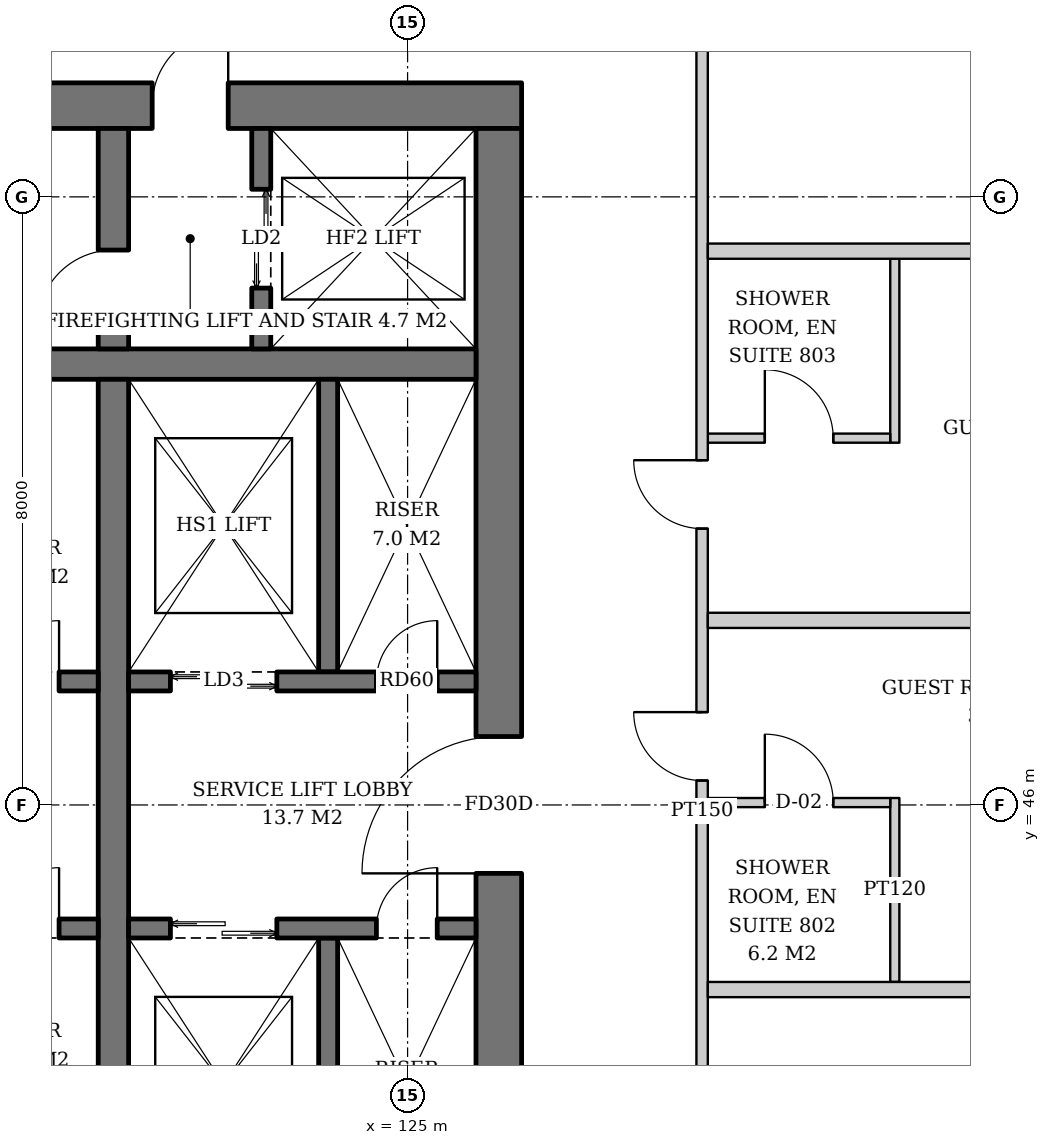
"""IFC4 building model, lengths in metres.
Left out: names, types, materials, properties, quantities, classifications, styles, units other than length and angle.
Written with IfcOpenShell. Run it as: python <this file> out.ifc"""

import sys

from ifc_helpers import new_model, si_unit, direction, frame, frame_2d, origin, place, context, subcontext, project, spatial, rectangle, extrude, element, fill, save


model = new_model("IFC4")
c1 = context("Model", 3, precision=1e-05, world=origin(), true_north=direction((0.0, 1.0)))
c2 = subcontext(c1, "Body", "Model", "MODEL_VIEW")
j1 = project(units=[si_unit("LENGTHUNIT", "METRE"), si_unit("PLANEANGLEUNIT", "RADIAN")], contexts=[c1])
p1 = place(None, origin())
s1 = spatial("IfcSite", under=j1, at=p1, CompositionType="ELEMENT")
p2 = place(p1, origin())
s2 = spatial("IfcBuilding", under=s1, at=p2, CompositionType="ELEMENT")
p3 = place(p2, frame((0.0, 0.0, 36.2)))
s3 = spatial("IfcBuildingStorey", under=s2, at=p3, CompositionType="ELEMENT", Elevation=36.2)
p4 = place(p3, frame((107.5, 55.2, 0.0), z_axis=(0.0, 0.0, 1.0), x_axis=(1.0, 0.0, 0.0)))
e1 = element("IfcWall", 1, at=p4, inside=s3, PredefinedType="SHEAR", context=c2, shape_type="SweptSolid", body=[
    extrude(rectangle(XDim=19.0, YDim=0.6, at=frame_2d((9.5, 0.0))), origin(), (0.0, 0.0, 1.0), 3.8),
])
p5 = place(p4, frame((14.14, 0.0, 0.0)))
e2 = element("IfcOpeningElement", 2, at=p5, cuts=e1, PredefinedType="OPENING", context=c2, shape_type="SweptSolid", body=[
    extrude(rectangle(XDim=1.0, YDim=2.1, at=frame_2d((0.5, 1.05))), frame((0.0, 0.31, 0.0), z_axis=(0.0, -1.0, 0.0), x_axis=(1.0, 0.0, 0.0)), (0.0, 0.0, 1.0), 0.62),
])
p6 = place(p4, frame((2.425, 0.0, 0.0)))
e3 = element("IfcOpeningElement", 3, at=p6, cuts=e1, PredefinedType="OPENING", context=c2, shape_type="SweptSolid", body=[
    extrude(rectangle(XDim=1.0, YDim=2.1, at=frame_2d((0.5, 1.05))), frame((0.0, 0.31, 0.0), z_axis=(0.0, -1.0, 0.0), x_axis=(1.0, 0.0, 0.0)), (0.0, 0.0, 1.0), 0.62),
])
p7 = place(p3, frame((126.2, 37.1, 0.0), z_axis=(0.0, 0.0, 1.0), x_axis=(0.0, 1.0, 0.0)))
e4 = element("IfcWall", 4, at=p7, inside=s3, PredefinedType="SHEAR", context=c2, shape_type="SweptSolid", body=[
    extrude(rectangle(XDim=17.8, YDim=0.6, at=frame_2d((8.9, 0.0))), origin(), (0.0, 0.0, 1.0), 3.8),
])
p8 = place(p7, frame((8.0, 0.0, 0.0)))
e5 = element("IfcOpeningElement", 5, at=p8, cuts=e4, PredefinedType="OPENING", context=c2, shape_type="SweptSolid", body=[
    extrude(rectangle(XDim=1.8, YDim=2.4, at=frame_2d((0.9, 1.2))), frame((0.0, 0.31, 0.0), z_axis=(0.0, -1.0, 0.0), x_axis=(1.0, 0.0, 0.0)), (0.0, 0.0, 1.0), 0.62),
])
p9 = place(p3, frame((108.1, 51.8, 0.0), z_axis=(0.0, 0.0, 1.0), x_axis=(1.0, 0.0, 0.0)))
e6 = element("IfcWall", 6, at=p9, inside=s3, PredefinedType="SHEAR", context=c2, shape_type="SweptSolid", body=[
    extrude(rectangle(XDim=17.8, YDim=0.4, at=frame_2d((8.9, 0.0))), origin(), (0.0, 0.0, 1.0), 3.8),
])
p10 = place(p3, frame((121.13, 40.4, 0.0), z_axis=(0.0, 0.0, 1.0), x_axis=(0.0, 1.0, 0.0)))
e7 = element("IfcWall", 7, at=p10, inside=s3, PredefinedType="SHEAR", context=c2, shape_type="SweptSolid", body=[
    extrude(rectangle(XDim=11.2, YDim=0.4, at=frame_2d((5.6, 0.0))), origin(), (0.0, 0.0, 1.0), 3.8),
])
p11 = place(p3, frame((121.13, 52.0, 0.0), z_axis=(0.0, 0.0, 1.0), x_axis=(0.0, 1.0, 0.0)))
e8 = element("IfcWall", 8, at=p11, inside=s3, PredefinedType="SHEAR", context=c2, shape_type="SweptSolid", body=[
    extrude(rectangle(XDim=2.9, YDim=0.4, at=frame_2d((1.45, 0.0))), origin(), (0.0, 0.0, 1.0), 3.8),
])
p12 = place(p11, frame((0.3, 0.0, 0.0)))
e9 = element("IfcOpeningElement", 9, at=p12, cuts=e8, PredefinedType="OPENING", context=c2, shape_type="SweptSolid", body=[
    extrude(rectangle(XDim=1.0, YDim=2.1, at=frame_2d((0.5, 1.05))), frame((0.0, 0.21, 0.0), z_axis=(0.0, -1.0, 0.0), x_axis=(1.0, 0.0, 0.0)), (0.0, 0.0, 1.0), 0.42),
])
p13 = place(p3, frame((123.075, 52.0, 0.0), z_axis=(0.0, 0.0, 1.0), x_axis=(0.0, 1.0, 0.0)))
e10 = element("IfcWall", 10, at=p13, inside=s3, PredefinedType="SHEAR", context=c2, shape_type="SweptSolid", body=[
    extrude(rectangle(XDim=2.9, YDim=0.25, at=frame_2d((1.45, 0.0))), origin(), (0.0, 0.0, 1.0), 3.8),
])
p14 = place(p13, frame((0.8, 0.0, 0.0)))
e11 = element("IfcOpeningElement", 11, at=p14, cuts=e10, PredefinedType="OPENING", context=c2, shape_type="SweptSolid", body=[
    extrude(rectangle(XDim=1.3, YDim=2.2, at=frame_2d((0.65, 1.1))), frame((0.0, 0.135, 0.0), z_axis=(0.0, -1.0, 0.0), x_axis=(1.0, 0.0, 0.0)), (0.0, 0.0, 1.0), 0.27),
])
p15 = place(p3, frame((108.1, 47.625, 0.0), z_axis=(0.0, 0.0, 1.0), x_axis=(1.0, 0.0, 0.0)))
e12 = element("IfcWall", 12, at=p15, inside=s3, PredefinedType="SHEAR", context=c2, shape_type="SweptSolid", body=[
    extrude(rectangle(XDim=12.83, YDim=0.25, at=frame_2d((6.415, 0.0))), origin(), (0.0, 0.0, 1.0), 3.8),
])
p16 = place(p15, frame((0.7, 0.0, 0.0)))
e13 = element("IfcOpeningElement", 13, at=p16, cuts=e12, PredefinedType="OPENING", context=c2, shape_type="SweptSolid", body=[
    extrude(rectangle(XDim=1.1, YDim=2.2, at=frame_2d((0.55, 1.1))), frame((0.0, 0.135, 0.0), z_axis=(0.0, -1.0, 0.0), x_axis=(1.0, 0.0, 0.0)), (0.0, 0.0, 1.0), 0.27),
])
p17 = place(p15, frame((3.45, 0.0, 0.0)))
e14 = element("IfcOpeningElement", 14, at=p17, cuts=e12, PredefinedType="OPENING", context=c2, shape_type="SweptSolid", body=[
    extrude(rectangle(XDim=1.1, YDim=2.2, at=frame_2d((0.55, 1.1))), frame((0.0, 0.135, 0.0), z_axis=(0.0, -1.0, 0.0), x_axis=(1.0, 0.0, 0.0)), (0.0, 0.0, 1.0), 0.27),
])
p18 = place(p15, frame((6.2, 0.0, 0.0)))
e15 = element("IfcOpeningElement", 15, at=p18, cuts=e12, PredefinedType="OPENING", context=c2, shape_type="SweptSolid", body=[
    extrude(rectangle(XDim=1.1, YDim=2.2, at=frame_2d((0.55, 1.1))), frame((0.0, 0.135, 0.0), z_axis=(0.0, -1.0, 0.0), x_axis=(1.0, 0.0, 0.0)), (0.0, 0.0, 1.0), 0.27),
])
p19 = place(p15, frame((8.95, 0.0, 0.0)))
e16 = element("IfcOpeningElement", 16, at=p19, cuts=e12, PredefinedType="OPENING", context=c2, shape_type="SweptSolid", body=[
    extrude(rectangle(XDim=1.1, YDim=2.2, at=frame_2d((0.55, 1.1))), frame((0.0, 0.135, 0.0), z_axis=(0.0, -1.0, 0.0), x_axis=(1.0, 0.0, 0.0)), (0.0, 0.0, 1.0), 0.27),
])
p20 = place(p15, frame((11.515, 0.0, 0.0)))
e17 = element("IfcOpeningElement", 17, at=p20, cuts=e12, PredefinedType="OPENING", context=c2, shape_type="SweptSolid", body=[
    extrude(rectangle(XDim=0.8, YDim=2.0, at=frame_2d((0.4, 1.0))), frame((0.0, 0.135, 0.0), z_axis=(0.0, -1.0, 0.0), x_axis=(1.0, 0.0, 0.0)), (0.0, 0.0, 1.0), 0.27),
])
p21 = place(p3, frame((108.1, 44.375, 0.0), z_axis=(0.0, 0.0, 1.0), x_axis=(1.0, 0.0, 0.0)))
e18 = element("IfcWall", 18, at=p21, inside=s3, PredefinedType="SHEAR", context=c2, shape_type="SweptSolid", body=[
    extrude(rectangle(XDim=12.83, YDim=0.25, at=frame_2d((6.415, 0.0))), origin(), (0.0, 0.0, 1.0), 3.8),
])
p22 = place(p21, frame((0.7, 0.0, 0.0)))
e19 = element("IfcOpeningElement", 19, at=p22, cuts=e18, PredefinedType="OPENING", context=c2, shape_type="SweptSolid", body=[
    extrude(rectangle(XDim=1.1, YDim=2.2, at=frame_2d((0.55, 1.1))), frame((0.0, 0.135, 0.0), z_axis=(0.0, -1.0, 0.0), x_axis=(1.0, 0.0, 0.0)), (0.0, 0.0, 1.0), 0.27),
])
p23 = place(p21, frame((3.45, 0.0, 0.0)))
e20 = element("IfcOpeningElement", 20, at=p23, cuts=e18, PredefinedType="OPENING", context=c2, shape_type="SweptSolid", body=[
    extrude(rectangle(XDim=1.1, YDim=2.2, at=frame_2d((0.55, 1.1))), frame((0.0, 0.135, 0.0), z_axis=(0.0, -1.0, 0.0), x_axis=(1.0, 0.0, 0.0)), (0.0, 0.0, 1.0), 0.27),
])
p24 = place(p21, frame((6.2, 0.0, 0.0)))
e21 = element("IfcOpeningElement", 21, at=p24, cuts=e18, PredefinedType="OPENING", context=c2, shape_type="SweptSolid", body=[
    extrude(rectangle(XDim=1.1, YDim=2.2, at=frame_2d((0.55, 1.1))), frame((0.0, 0.135, 0.0), z_axis=(0.0, -1.0, 0.0), x_axis=(1.0, 0.0, 0.0)), (0.0, 0.0, 1.0), 0.27),
])
p25 = place(p21, frame((9.0, 0.0, 0.0)))
e22 = element("IfcOpeningElement", 22, at=p25, cuts=e18, PredefinedType="OPENING", context=c2, shape_type="SweptSolid", body=[
    extrude(rectangle(XDim=1.0, YDim=2.1, at=frame_2d((0.5, 1.05))), frame((0.0, 0.135, 0.0), z_axis=(0.0, -1.0, 0.0), x_axis=(1.0, 0.0, 0.0)), (0.0, 0.0, 1.0), 0.27),
])
p26 = place(p21, frame((11.515, 0.0, 0.0)))
e23 = element("IfcOpeningElement", 23, at=p26, cuts=e18, PredefinedType="OPENING", context=c2, shape_type="SweptSolid", body=[
    extrude(rectangle(XDim=0.8, YDim=2.0, at=frame_2d((0.4, 1.0))), frame((0.0, 0.135, 0.0), z_axis=(0.0, -1.0, 0.0), x_axis=(1.0, 0.0, 0.0)), (0.0, 0.0, 1.0), 0.27),
])
p27 = place(p3, frame((123.955, 47.75, 0.0), z_axis=(0.0, 0.0, 1.0), x_axis=(0.0, 1.0, 0.0)))
e24 = element("IfcWall", 24, at=p27, inside=s3, PredefinedType="SHEAR", context=c2, shape_type="SweptSolid", body=[
    extrude(rectangle(XDim=3.85, YDim=0.25, at=frame_2d((1.925, 0.0))), origin(), (0.0, 0.0, 1.0), 3.8),
])
p28 = place(p3, frame((121.33, 47.625, 0.0), z_axis=(0.0, 0.0, 1.0), x_axis=(1.0, 0.0, 0.0)))
e25 = element("IfcWall", 25, at=p28, inside=s3, PredefinedType="SHEAR", context=c2, shape_type="SweptSolid", body=[
    extrude(rectangle(XDim=4.57, YDim=0.25, at=frame_2d((2.285, 0.0))), origin(), (0.0, 0.0, 1.0), 3.8),
])
p29 = place(p28, frame((0.55, 0.0, 0.0)))
e26 = element("IfcOpeningElement", 26, at=p29, cuts=e25, PredefinedType="OPENING", context=c2, shape_type="SweptSolid", body=[
    extrude(rectangle(XDim=1.4, YDim=2.4, at=frame_2d((0.7, 1.2))), frame((0.0, 0.135, 0.0), z_axis=(0.0, -1.0, 0.0), x_axis=(1.0, 0.0, 0.0)), (0.0, 0.0, 1.0), 0.27),
])
p30 = place(p28, frame((3.26, 0.0, 0.0)))
e27 = element("IfcOpeningElement", 27, at=p30, cuts=e25, PredefinedType="OPENING", context=c2, shape_type="SweptSolid", body=[
    extrude(rectangle(XDim=0.8, YDim=2.0, at=frame_2d((0.4, 1.0))), frame((0.0, 0.135, 0.0), z_axis=(0.0, -1.0, 0.0), x_axis=(1.0, 0.0, 0.0)), (0.0, 0.0, 1.0), 0.27),
])
p31 = place(p3, frame((123.955, 44.25, 0.0), z_axis=(0.0, 0.0, 1.0), x_axis=(0.0, -1.0, 0.0)))
e28 = element("IfcWall", 28, at=p31, inside=s3, PredefinedType="SHEAR", context=c2, shape_type="SweptSolid", body=[
    extrude(rectangle(XDim=3.85, YDim=0.25, at=frame_2d((1.925, 0.0))), origin(), (0.0, 0.0, 1.0), 3.8),
])
p32 = place(p3, frame((121.33, 44.375, 0.0), z_axis=(0.0, 0.0, 1.0), x_axis=(1.0, 0.0, 0.0)))
e29 = element("IfcWall", 29, at=p32, inside=s3, PredefinedType="SHEAR", context=c2, shape_type="SweptSolid", body=[
    extrude(rectangle(XDim=4.57, YDim=0.25, at=frame_2d((2.285, 0.0))), origin(), (0.0, 0.0, 1.0), 3.8),
])
p33 = place(p32, frame((0.55, 0.0, 0.0)))
e30 = element("IfcOpeningElement", 30, at=p33, cuts=e29, PredefinedType="OPENING", context=c2, shape_type="SweptSolid", body=[
    extrude(rectangle(XDim=1.4, YDim=2.4, at=frame_2d((0.7, 1.2))), frame((0.0, 0.135, 0.0), z_axis=(0.0, -1.0, 0.0), x_axis=(1.0, 0.0, 0.0)), (0.0, 0.0, 1.0), 0.27),
])
p34 = place(p32, frame((3.26, 0.0, 0.0)))
e31 = element("IfcOpeningElement", 31, at=p34, cuts=e29, PredefinedType="OPENING", context=c2, shape_type="SweptSolid", body=[
    extrude(rectangle(XDim=0.8, YDim=2.0, at=frame_2d((0.4, 1.0))), frame((0.0, 0.135, 0.0), z_axis=(0.0, -1.0, 0.0), x_axis=(1.0, 0.0, 0.0)), (0.0, 0.0, 1.0), 0.27),
])
p35 = place(p3, frame((131.41, 43.671, 0.0), z_axis=(0.0, 0.0, 1.0), x_axis=(0.0, 1.0, 0.0)))
e32 = element("IfcWall", 32, at=p35, inside=s3, PredefinedType="PARTITIONING", context=c2, shape_type="SweptSolid", body=[
    extrude(rectangle(XDim=2.42, YDim=0.12, at=frame_2d((1.21, 0.0))), origin(), (0.0, 0.0, 1.0), 2.847),
])
p36 = place(p3, frame((128.95, 46.031, 0.0), z_axis=(0.0, 0.0, 1.0), x_axis=(1.0, 0.0, 0.0)))
e33 = element("IfcWall", 33, at=p36, inside=s3, PredefinedType="PARTITIONING", context=c2, shape_type="SweptSolid", body=[
    extrude(rectangle(XDim=2.4, YDim=0.12, at=frame_2d((1.2, 0.0))), origin(), (0.0, 0.0, 1.0), 3.6),
])
p37 = place(p36, frame((0.75, 0.0, 0.0)))
e34 = element("IfcOpeningElement", 34, at=p37, cuts=e33, PredefinedType="OPENING", context=c2, shape_type="SweptSolid", body=[
    extrude(rectangle(XDim=0.9, YDim=2.1, at=frame_2d((0.45, 1.05))), frame((0.0, 0.07, 0.0), z_axis=(0.0, -1.0, 0.0), x_axis=(1.0, 0.0, 0.0)), (0.0, 0.0, 1.0), 0.14),
])
p38 = place(p3, frame((131.41, 50.766, 0.0), z_axis=(0.0, 0.0, 1.0), x_axis=(0.0, 1.0, 0.0)))
e35 = element("IfcWall", 35, at=p38, inside=s3, PredefinedType="PARTITIONING", context=c2, shape_type="SweptSolid", body=[
    extrude(rectangle(XDim=2.42, YDim=0.12, at=frame_2d((1.21, 0.0))), origin(), (0.0, 0.0, 1.0), 2.847),
])
p39 = place(p3, frame((128.95, 50.826, 0.0), z_axis=(0.0, 0.0, 1.0), x_axis=(1.0, 0.0, 0.0)))
e36 = element("IfcWall", 36, at=p39, inside=s3, PredefinedType="PARTITIONING", context=c2, shape_type="SweptSolid", body=[
    extrude(rectangle(XDim=2.4, YDim=0.12, at=frame_2d((1.2, 0.0))), origin(), (0.0, 0.0, 1.0), 3.6),
])
p40 = place(p39, frame((0.75, 0.0, 0.0)))
e37 = element("IfcOpeningElement", 37, at=p40, cuts=e36, PredefinedType="OPENING", context=c2, shape_type="SweptSolid", body=[
    extrude(rectangle(XDim=0.9, YDim=2.1, at=frame_2d((0.45, 1.05))), frame((0.0, 0.07, 0.0), z_axis=(0.0, -1.0, 0.0), x_axis=(1.0, 0.0, 0.0)), (0.0, 0.0, 1.0), 0.14),
])
p41 = place(p3, frame((128.875, 34.05, 0.0), z_axis=(0.0, 0.0, 1.0), x_axis=(0.0, 1.0, 0.0)))
e38 = element("IfcWall", 38, at=p41, inside=s3, PredefinedType="PARTITIONING", context=c2, shape_type="SweptSolid", body=[
    extrude(rectangle(XDim=23.75, YDim=0.15, at=frame_2d((11.875, 0.0))), origin(), (0.0, 0.0, 1.0), 2.8),
])
p42 = place(p41, frame((1.907, 0.0, 0.0)))
e39 = element("IfcOpeningElement", 39, at=p42, cuts=e38, PredefinedType="OPENING", context=c2, shape_type="SweptSolid", body=[
    extrude(rectangle(XDim=0.9, YDim=2.1, at=frame_2d((0.45, 1.05))), frame((0.0, 0.085, 0.0), z_axis=(0.0, -1.0, 0.0), x_axis=(1.0, 0.0, 0.0)), (0.0, 0.0, 1.0), 0.17),
])
p43 = place(p41, frame((12.271, 0.0, 0.0)))
e40 = element("IfcOpeningElement", 40, at=p43, cuts=e38, PredefinedType="OPENING", context=c2, shape_type="SweptSolid", body=[
    extrude(rectangle(XDim=0.9, YDim=2.1, at=frame_2d((0.45, 1.05))), frame((0.0, 0.085, 0.0), z_axis=(0.0, -1.0, 0.0), x_axis=(1.0, 0.0, 0.0)), (0.0, 0.0, 1.0), 0.17),
])
p44 = place(p41, frame((15.586, 0.0, 0.0)))
e41 = element("IfcOpeningElement", 41, at=p44, cuts=e38, PredefinedType="OPENING", context=c2, shape_type="SweptSolid", body=[
    extrude(rectangle(XDim=0.9, YDim=2.1, at=frame_2d((0.45, 1.05))), frame((0.0, 0.085, 0.0), z_axis=(0.0, -1.0, 0.0), x_axis=(1.0, 0.0, 0.0)), (0.0, 0.0, 1.0), 0.17),
])
p45 = place(p3, frame((128.95, 43.572, 0.0), z_axis=(0.0, 0.0, 1.0), x_axis=(1.0, 0.0, 0.0)))
e42 = element("IfcWall", 42, at=p45, inside=s3, PredefinedType="PARTITIONING", context=c2, shape_type="SweptSolid", body=[
    extrude(rectangle(XDim=8.09, YDim=0.2, at=frame_2d((4.045, 0.0))), origin(), (0.0, 0.0, 1.0), 3.05),
])
p46 = place(p3, frame((128.95, 48.428, 0.0), z_axis=(0.0, 0.0, 1.0), x_axis=(1.0, 0.0, 0.0)))
e43 = element("IfcWall", 43, at=p46, inside=s3, PredefinedType="PARTITIONING", context=c2, shape_type="SweptSolid", body=[
    extrude(rectangle(XDim=8.09, YDim=0.2, at=frame_2d((4.045, 0.0))), origin(), (0.0, 0.0, 1.0), 2.847),
])
p47 = place(p3, frame((128.95, 53.286, 0.0), z_axis=(0.0, 0.0, 1.0), x_axis=(1.0, 0.0, 0.0)))
e44 = element("IfcWall", 44, at=p47, inside=s3, PredefinedType="PARTITIONING", context=c2, shape_type="SweptSolid", body=[
    extrude(rectangle(XDim=5.824, YDim=0.2, at=frame_2d((2.912, 0.0))), origin(), (0.0, 0.0, 1.0), 3.6),
])
p48 = place(p14, origin())
e45 = element("IfcDoor", 45, at=p48, inside=s3, OperationType="DOUBLE_DOOR_SLIDING", PredefinedType="DOOR", context=c2, shape_type="SweptSolid", body=[
    extrude(rectangle(XDim=1.3, YDim=2.2, at=frame_2d((0.65, 1.1))), frame((0.0, 0.025, 0.0), z_axis=(0.0, -1.0, 0.0), x_axis=(1.0, 0.0, 0.0)), (0.0, 0.0, 1.0), 0.05),
])
fill(e11, e45)
p49 = place(p20, origin())
e46 = element("IfcDoor", 46, at=p49, inside=s3, OperationType="SINGLE_SWING_RIGHT", PredefinedType="DOOR", context=c2, shape_type="SweptSolid", body=[
    extrude(rectangle(XDim=0.8, YDim=2.0, at=frame_2d((0.4, 1.0))), frame((0.0, 0.025, 0.0), z_axis=(0.0, -1.0, 0.0), x_axis=(1.0, 0.0, 0.0)), (0.0, 0.0, 1.0), 0.05),
])
fill(e17, e46)
p50 = place(p26, origin())
e47 = element("IfcDoor", 47, at=p50, inside=s3, OperationType="SINGLE_SWING_RIGHT", PredefinedType="DOOR", context=c2, shape_type="SweptSolid", body=[
    extrude(rectangle(XDim=0.8, YDim=2.0, at=frame_2d((0.4, 1.0))), frame((0.0, 0.025, 0.0), z_axis=(0.0, -1.0, 0.0), x_axis=(1.0, 0.0, 0.0)), (0.0, 0.0, 1.0), 0.05),
])
fill(e23, e47)
p51 = place(p29, origin())
e48 = element("IfcDoor", 48, at=p51, inside=s3, OperationType="DOUBLE_DOOR_SLIDING", PredefinedType="DOOR", context=c2, shape_type="SweptSolid", body=[
    extrude(rectangle(XDim=1.4, YDim=2.4, at=frame_2d((0.7, 1.2))), frame((0.0, 0.025, 0.0), z_axis=(0.0, -1.0, 0.0), x_axis=(1.0, 0.0, 0.0)), (0.0, 0.0, 1.0), 0.05),
])
fill(e26, e48)
p52 = place(p30, origin())
e49 = element("IfcDoor", 49, at=p52, inside=s3, OperationType="SINGLE_SWING_RIGHT", PredefinedType="DOOR", context=c2, shape_type="SweptSolid", body=[
    extrude(rectangle(XDim=0.8, YDim=2.0, at=frame_2d((0.4, 1.0))), frame((0.0, 0.025, 0.0), z_axis=(0.0, -1.0, 0.0), x_axis=(1.0, 0.0, 0.0)), (0.0, 0.0, 1.0), 0.05),
])
fill(e27, e49)
p53 = place(p33, origin())
e50 = element("IfcDoor", 50, at=p53, inside=s3, OperationType="DOUBLE_DOOR_SLIDING", PredefinedType="DOOR", context=c2, shape_type="SweptSolid", body=[
    extrude(rectangle(XDim=1.4, YDim=2.4, at=frame_2d((0.7, 1.2))), frame((0.0, 0.025, 0.0), z_axis=(0.0, -1.0, 0.0), x_axis=(1.0, 0.0, 0.0)), (0.0, 0.0, 1.0), 0.05),
])
fill(e30, e50)
p54 = place(p34, origin())
e51 = element("IfcDoor", 51, at=p54, inside=s3, OperationType="SINGLE_SWING_RIGHT", PredefinedType="DOOR", context=c2, shape_type="SweptSolid", body=[
    extrude(rectangle(XDim=0.8, YDim=2.0, at=frame_2d((0.4, 1.0))), frame((0.0, 0.025, 0.0), z_axis=(0.0, -1.0, 0.0), x_axis=(1.0, 0.0, 0.0)), (0.0, 0.0, 1.0), 0.05),
])
fill(e31, e51)
p55 = place(p12, origin())
e52 = element("IfcDoor", 52, at=p55, inside=s3, OperationType="SINGLE_SWING_LEFT", PredefinedType="DOOR", context=c2, shape_type="SweptSolid", body=[
    extrude(rectangle(XDim=1.0, YDim=2.1, at=frame_2d((0.5, 1.05))), frame((0.0, 0.025, 0.0), z_axis=(0.0, -1.0, 0.0), x_axis=(1.0, 0.0, 0.0)), (0.0, 0.0, 1.0), 0.05),
])
fill(e9, e52)
p56 = place(p5, origin())
e53 = element("IfcDoor", 53, at=p56, inside=s3, OperationType="SINGLE_SWING_RIGHT", PredefinedType="DOOR", context=c2, shape_type="SweptSolid", body=[
    extrude(rectangle(XDim=1.0, YDim=2.1, at=frame_2d((0.5, 1.05))), frame((0.0, 0.025, 0.0), z_axis=(0.0, -1.0, 0.0), x_axis=(1.0, 0.0, 0.0)), (0.0, 0.0, 1.0), 0.05),
])
fill(e2, e53)
p57 = place(p8, origin())
e54 = element("IfcDoor", 54, at=p57, inside=s3, OperationType="DOUBLE_DOOR_SINGLE_SWING", PredefinedType="DOOR", context=c2, shape_type="SweptSolid", body=[
    extrude(rectangle(XDim=1.8, YDim=2.4, at=frame_2d((0.9, 1.2))), frame((0.0, 0.025, 0.0), z_axis=(0.0, -1.0, 0.0), x_axis=(1.0, 0.0, 0.0)), (0.0, 0.0, 1.0), 0.05),
])
fill(e5, e54)
p58 = place(p37, origin())
e55 = element("IfcDoor", 55, at=p58, inside=s3, OperationType="SINGLE_SWING_LEFT", PredefinedType="DOOR", context=c2, shape_type="SweptSolid", body=[
    extrude(rectangle(XDim=0.9, YDim=2.1, at=frame_2d((0.45, 1.05))), frame((0.0, 0.025, 0.0), z_axis=(0.0, -1.0, 0.0), x_axis=(1.0, 0.0, 0.0)), (0.0, 0.0, 1.0), 0.05),
])
fill(e34, e55)
p59 = place(p40, origin())
e56 = element("IfcDoor", 56, at=p59, inside=s3, OperationType="SINGLE_SWING_LEFT", PredefinedType="DOOR", context=c2, shape_type="SweptSolid", body=[
    extrude(rectangle(XDim=0.9, YDim=2.1, at=frame_2d((0.45, 1.05))), frame((0.0, 0.025, 0.0), z_axis=(0.0, -1.0, 0.0), x_axis=(1.0, 0.0, 0.0)), (0.0, 0.0, 1.0), 0.05),
])
fill(e37, e56)
p60 = place(p43, origin())
e57 = element("IfcDoor", 57, at=p60, inside=s3, OperationType="SINGLE_SWING_RIGHT", PredefinedType="DOOR", context=c2, shape_type="SweptSolid", body=[
    extrude(rectangle(XDim=0.9, YDim=2.1, at=frame_2d((0.45, 1.05))), frame((0.0, 0.025, 0.0), z_axis=(0.0, -1.0, 0.0), x_axis=(1.0, 0.0, 0.0)), (0.0, 0.0, 1.0), 0.05),
])
fill(e40, e57)
p61 = place(p44, origin())
e58 = element("IfcDoor", 58, at=p61, inside=s3, OperationType="SINGLE_SWING_RIGHT", PredefinedType="DOOR", context=c2, shape_type="SweptSolid", body=[
    extrude(rectangle(XDim=0.9, YDim=2.1, at=frame_2d((0.45, 1.05))), frame((0.0, 0.025, 0.0), z_axis=(0.0, -1.0, 0.0), x_axis=(1.0, 0.0, 0.0)), (0.0, 0.0, 1.0), 0.05),
])
fill(e41, e58)
save(model, sys.argv[1])
